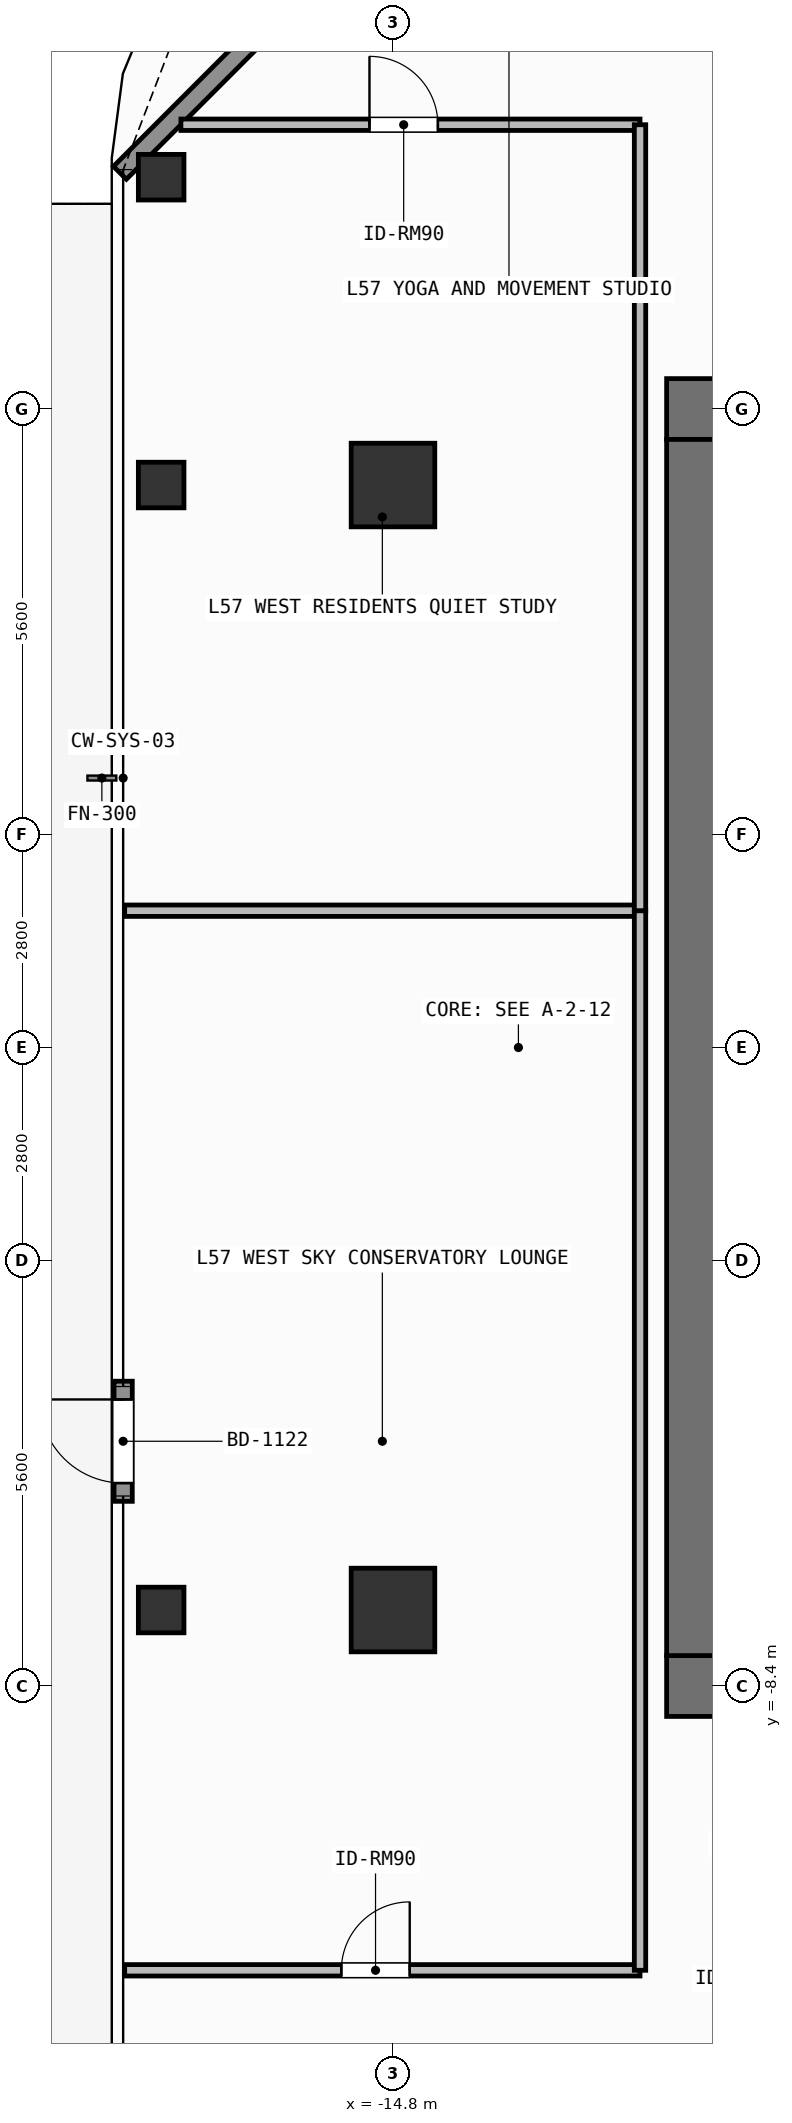
"""IFC4 building model, lengths in metres.
Left out: names, types, materials, properties, quantities, classifications, styles, units other than length and angle.
Written with IfcOpenShell. Run it as: python <this file> out.ifc"""

import sys

from ifc_helpers import new_model, si_unit, direction, frame, frame_2d, origin, origin_2d, place, context, subcontext, project, spatial, rectangle, hollow_rectangle, extrude, element, fill, save


model = new_model("IFC4")
c1 = context("Model", 3, precision=1e-05, world=origin(), true_north=direction((0.0, 1.0)))
c2 = subcontext(c1, "Body", "Model", "MODEL_VIEW")
j1 = project(units=[si_unit("LENGTHUNIT", "METRE"), si_unit("PLANEANGLEUNIT", "RADIAN")], contexts=[c1])
p1 = place(None, origin())
s1 = spatial("IfcSite", under=j1, at=p1, CompositionType="ELEMENT")
p2 = place(p1, origin())
s2 = spatial("IfcBuilding", under=s1, at=p2, CompositionType="ELEMENT")
p3 = place(p2, frame((0.0, 0.0, 231.3)))
s3 = spatial("IfcBuildingStorey", under=s2, at=p3, CompositionType="ELEMENT", Elevation=231.3)
for number, where, z_axis, x_axis in (
    (1, (-11.2, -8.4, 0.0), (0.0, 0.0, 1.0), (1.0, 0.0, 0.0)),
    (2, (-11.2, 8.4, 0.0), (0.0, 0.0, 1.0), (1.0, 0.0, 0.0)),
):
    element("IfcWall", number, at=place(p3, frame(where, z_axis=z_axis, x_axis=x_axis)), inside=s3, PredefinedType="SHEAR", context=c2, shape_type="SweptSolid", body=[
        extrude(rectangle(XDim=1.5, YDim=0.8, at=frame_2d((0.75, 0.0))), origin(), (0.0, 0.0, 1.0), 3.9),
    ])
p4 = place(p3, frame((-10.8, -8.0, 0.0), z_axis=(0.0, 0.0, 1.0), x_axis=(0.0, 1.0, 0.0)))
e3 = element("IfcWall", 3, at=p4, inside=s3, PredefinedType="SHEAR", context=c2, shape_type="SweptSolid", body=[
    extrude(rectangle(XDim=16.0, YDim=0.8, at=frame_2d((8.0, 0.0))), origin(), (0.0, 0.0, 1.0), 3.9),
])
for number, where, z_axis, x_axis in (
    (4, (-14.8, -7.4, 0.0), (0.0, 0.0, 1.0), (1.0, 0.0, 0.0)),
    (5, (-14.8, 7.4, 0.0), (0.0, 0.0, 1.0), (1.0, 0.0, 0.0)),
):
    element("IfcColumn", number, at=place(p3, frame(where, z_axis=z_axis, x_axis=x_axis)), inside=s3, PredefinedType="COLUMN", context=c2, shape_type="SweptSolid", body=[
        extrude(rectangle(XDim=1.1, YDim=1.1, at=origin_2d()), origin(), (0.0, 0.0, 1.0), 3.9),
    ])
for number, where, z_axis, x_axis in (
    (6, (-17.85, 11.45, 0.0), (0.0, 0.0, 1.0), (1.0, 0.0, 0.0)),
    (7, (-17.85, -7.4, 0.0), (0.0, 0.0, 1.0), (1.0, 0.0, 0.0)),
    (8, (-17.85, 7.4, 0.0), (0.0, 0.0, 1.0), (1.0, 0.0, 0.0)),
):
    element("IfcColumn", number, at=place(p3, frame(where, z_axis=z_axis, x_axis=x_axis)), inside=s3, PredefinedType="COLUMN", context=c2, shape_type="SweptSolid", body=[
        extrude(hollow_rectangle(XDim=0.6, YDim=0.6, WallThickness=0.028, at=origin_2d()), origin(), (0.0, 0.0, 1.0), 3.9),
    ])
p5 = place(p3, frame((-18.35, -5.97, 0.0), z_axis=(0.0, 0.0, 1.0), x_axis=(0.0, 1.0, 0.0)))
e9 = element("IfcWall", 9, at=p5, inside=s3, PredefinedType="SOLIDWALL", context=c2, shape_type="SweptSolid", body=[
    extrude(rectangle(XDim=1.58, YDim=0.24, at=frame_2d((0.79, 0.0))), origin(), (0.0, 0.0, 1.0), 3.6),
])
p6 = place(p5, frame((0.24, 0.0, 0.0)))
e10 = element("IfcOpeningElement", 10, at=p6, cuts=e9, PredefinedType="OPENING", context=c2, shape_type="SweptSolid", body=[
    extrude(rectangle(XDim=1.1, YDim=2.2, at=frame_2d((0.55, 1.1))), frame((0.0, 0.13, 0.0), z_axis=(0.0, -1.0, 0.0), x_axis=(1.0, 0.0, 0.0)), (0.0, 0.0, 1.0), 0.26),
])
p7 = place(p3, frame((-18.392, 11.508, 0.0), z_axis=(0.0, 0.0, 1.0), x_axis=(0.707106781187, 0.707106781187, 0.0)))
e11 = element("IfcWall", 11, at=p7, inside=s3, PredefinedType="SOLIDWALL", context=c2, shape_type="SweptSolid", body=[
    extrude(rectangle(XDim=6.201, YDim=0.24, at=frame_2d((3.101, 0.0))), origin(), (0.0, 0.0, 1.0), 3.6),
])
p8 = place(p3, frame((-18.33, -12.14, 0.0), z_axis=(0.0, 0.0, 1.0), x_axis=(1.0, 0.0, 0.0)))
e12 = element("IfcWall", 12, at=p8, inside=s3, PredefinedType="PARTITIONING", context=c2, shape_type="SweptSolid", body=[
    extrude(rectangle(XDim=6.78, YDim=0.15, at=frame_2d((3.39, 0.0))), origin(), (0.0, 0.0, 1.0), 3.6),
])
p9 = place(p8, frame((2.85, 0.0, 0.0)))
e13 = element("IfcOpeningElement", 13, at=p9, cuts=e12, PredefinedType="OPENING", context=c2, shape_type="SweptSolid", body=[
    extrude(rectangle(XDim=0.9, YDim=2.1, at=frame_2d((0.45, 1.05))), frame((0.0, 0.085, 0.0), z_axis=(0.0, -1.0, 0.0), x_axis=(1.0, 0.0, 0.0)), (0.0, 0.0, 1.0), 0.17),
])
p10 = place(p3, frame((-17.59, 12.14, 0.0), z_axis=(0.0, 0.0, 1.0), x_axis=(1.0, 0.0, 0.0)))
e14 = element("IfcWall", 14, at=p10, inside=s3, PredefinedType="PARTITIONING", context=c2, shape_type="SweptSolid", body=[
    extrude(rectangle(XDim=6.04, YDim=0.15, at=frame_2d((3.02, 0.0))), origin(), (0.0, 0.0, 1.0), 3.6),
])
p11 = place(p10, frame((2.481, 0.0, 0.0)))
e15 = element("IfcOpeningElement", 15, at=p11, cuts=e14, PredefinedType="OPENING", context=c2, shape_type="SweptSolid", body=[
    extrude(rectangle(XDim=0.9, YDim=2.1, at=frame_2d((0.45, 1.05))), frame((0.0, 0.085, 0.0), z_axis=(0.0, -1.0, 0.0), x_axis=(1.0, 0.0, 0.0)), (0.0, 0.0, 1.0), 0.17),
])
p12 = place(p3, frame((-18.33, 1.8, 0.0), z_axis=(0.0, 0.0, 1.0), x_axis=(1.0, 0.0, 0.0)))
e16 = element("IfcWall", 16, at=p12, inside=s3, PredefinedType="PARTITIONING", context=c2, shape_type="SweptSolid", body=[
    extrude(rectangle(XDim=6.78, YDim=0.15, at=frame_2d((3.39, 0.0))), origin(), (0.0, 0.0, 1.0), 3.6),
])
p13 = place(p3, frame((-11.55, -12.14, 0.0), z_axis=(0.0, 0.0, 1.0), x_axis=(0.0, 1.0, 0.0)))
e17 = element("IfcWall", 17, at=p13, inside=s3, PredefinedType="PARTITIONING", context=c2, shape_type="SweptSolid", body=[
    extrude(rectangle(XDim=13.94, YDim=0.15, at=frame_2d((6.97, 0.0))), origin(), (0.0, 0.0, 1.0), 3.6),
])
p14 = place(p3, frame((-11.55, 1.8, 0.0), z_axis=(0.0, 0.0, 1.0), x_axis=(0.0, 1.0, 0.0)))
e18 = element("IfcWall", 18, at=p14, inside=s3, PredefinedType="PARTITIONING", context=c2, shape_type="SweptSolid", body=[
    extrude(rectangle(XDim=10.34, YDim=0.15, at=frame_2d((5.17, 0.0))), origin(), (0.0, 0.0, 1.0), 3.6),
])
p15 = place(p6, origin())
e19 = element("IfcDoor", 19, at=p15, inside=s3, OperationType="SINGLE_SWING_RIGHT", PredefinedType="DOOR", context=c2, shape_type="SweptSolid", body=[
    extrude(rectangle(XDim=1.1, YDim=2.2, at=frame_2d((0.55, 1.1))), frame((0.0, 0.025, 0.0), z_axis=(0.0, -1.0, 0.0), x_axis=(1.0, 0.0, 0.0)), (0.0, 0.0, 1.0), 0.05),
])
fill(e10, e19)
p16 = place(p9, origin())
e20 = element("IfcDoor", 20, at=p16, inside=s3, OperationType="SINGLE_SWING_RIGHT", PredefinedType="DOOR", context=c2, shape_type="SweptSolid", body=[
    extrude(rectangle(XDim=0.9, YDim=2.1, at=frame_2d((0.45, 1.05))), frame((0.0, 0.025, 0.0), z_axis=(0.0, -1.0, 0.0), x_axis=(1.0, 0.0, 0.0)), (0.0, 0.0, 1.0), 0.05),
])
fill(e13, e20)
p17 = place(p11, origin())
e21 = element("IfcDoor", 21, at=p17, inside=s3, OperationType="SINGLE_SWING_LEFT", PredefinedType="DOOR", context=c2, shape_type="SweptSolid", body=[
    extrude(rectangle(XDim=0.9, YDim=2.1, at=frame_2d((0.45, 1.05))), frame((0.0, 0.025, 0.0), z_axis=(0.0, -1.0, 0.0), x_axis=(1.0, 0.0, 0.0)), (0.0, 0.0, 1.0), 0.05),
])
fill(e15, e21)
save(model, sys.argv[1])
